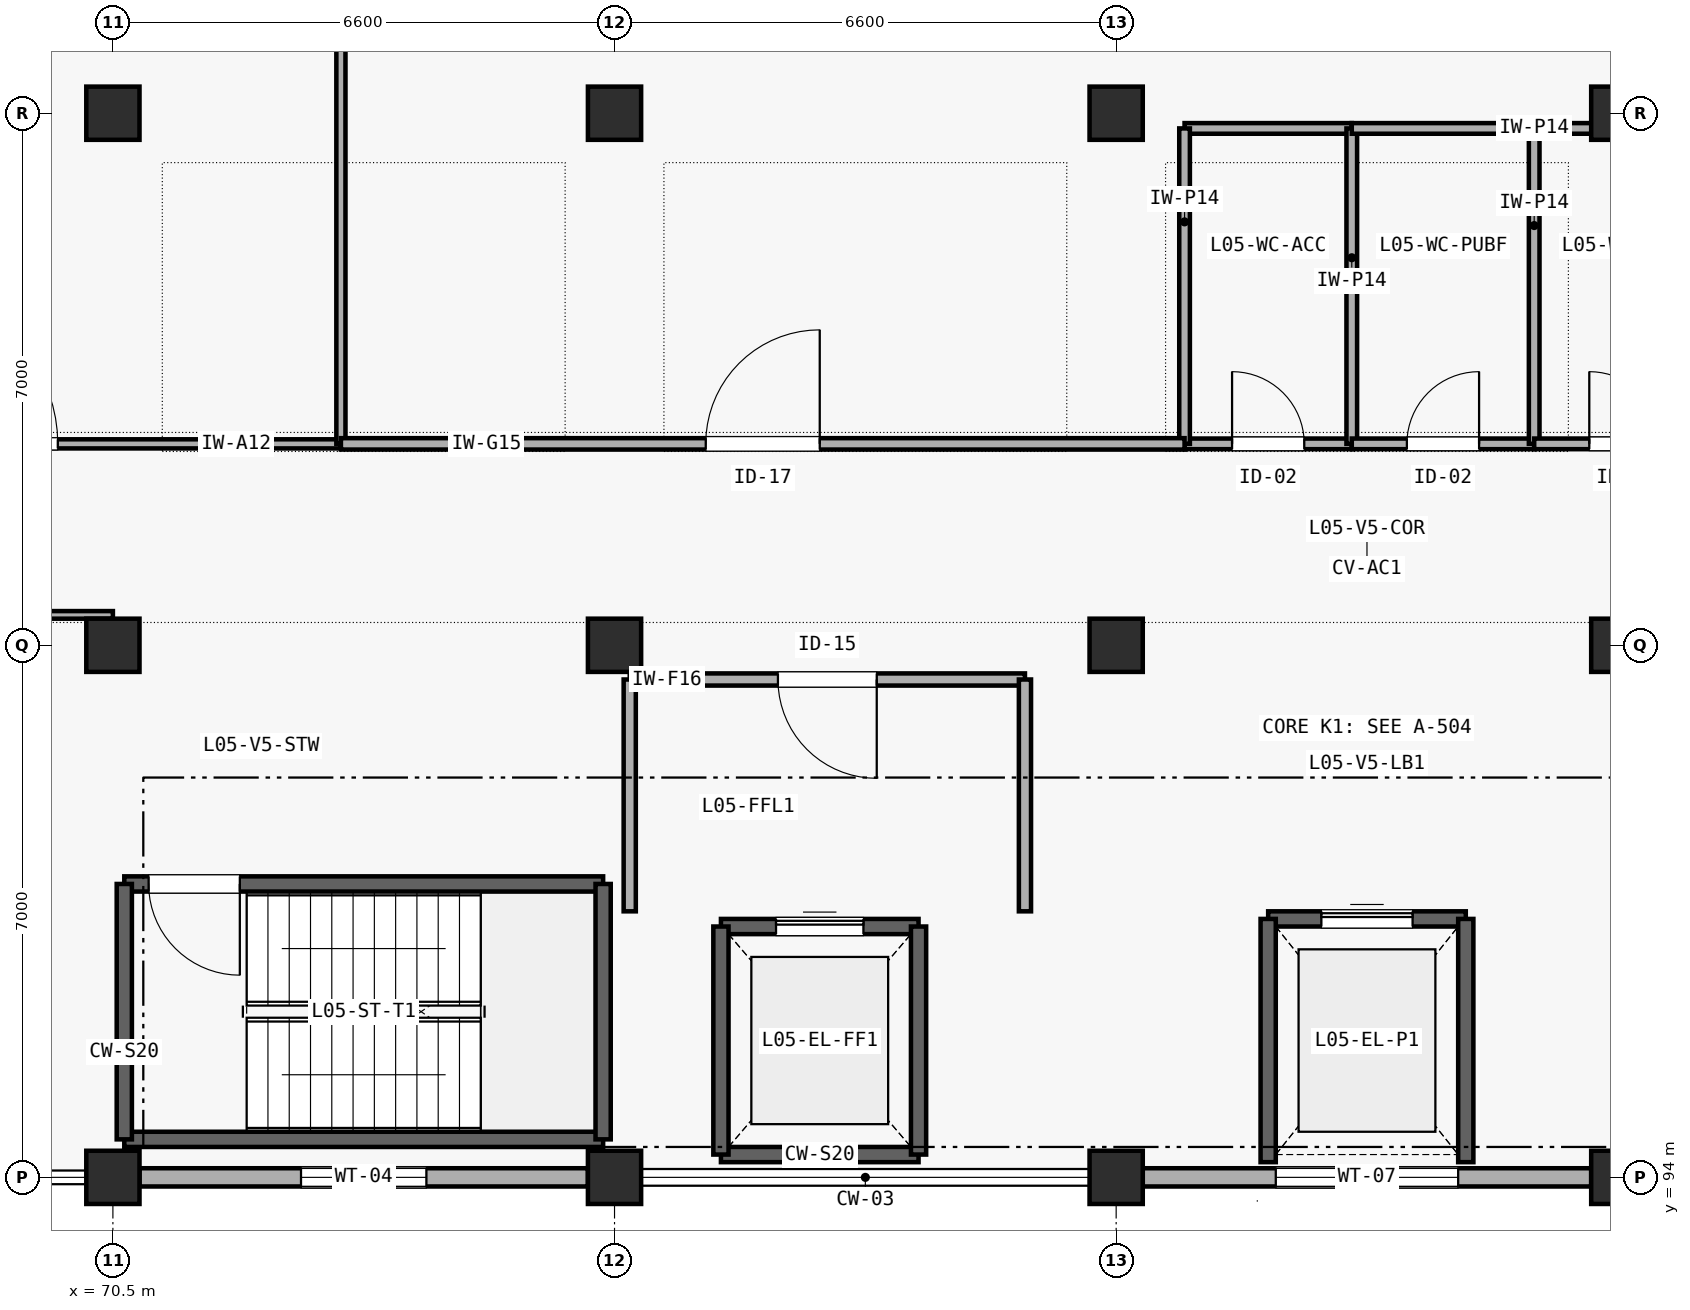
"""IFC4 building model, lengths in metres.
Left out: names, types, materials, properties, quantities, classifications, styles, units other than length and angle.
Written with IfcOpenShell. Run it as: python <this file> out.ifc"""

import sys

from ifc_helpers import new_model, si_unit, direction, frame, frame_2d, origin, origin_2d, place, context, subcontext, project, spatial, rectangle, extrude, element, fill, save


model = new_model("IFC4")
c1 = context("Model", 3, precision=1e-05, world=origin(), true_north=direction((0.0, 1.0)))
c2 = subcontext(c1, "Body", "Model", "MODEL_VIEW")
j1 = project(units=[si_unit("LENGTHUNIT", "METRE"), si_unit("PLANEANGLEUNIT", "RADIAN")], contexts=[c1])
p1 = place(None, origin())
s1 = spatial("IfcSite", under=j1, at=p1, CompositionType="ELEMENT")
p2 = place(p1, origin())
s2 = spatial("IfcBuilding", under=s1, at=p2, CompositionType="ELEMENT")
p3 = place(p2, frame((0.0, 0.0, 21.0)))
s3 = spatial("IfcBuildingStorey", under=s2, at=p3, CompositionType="ELEMENT", Elevation=21.0)
for number, where, z_axis, x_axis in (
    (1, (70.5, 94.0, 0.0), (0.0, 0.0, 1.0), (1.0, 0.0, 0.0)),
    (2, (70.5, 101.0, 0.0), (0.0, 0.0, 1.0), (1.0, 0.0, 0.0)),
    (3, (70.5, 108.0, 0.0), (0.0, 0.0, 1.0), (1.0, 0.0, 0.0)),
    (4, (77.1, 94.0, 0.0), (0.0, 0.0, 1.0), (1.0, 0.0, 0.0)),
    (5, (77.1, 101.0, 0.0), (0.0, 0.0, 1.0), (1.0, 0.0, 0.0)),
    (6, (77.1, 108.0, 0.0), (0.0, 0.0, 1.0), (1.0, 0.0, 0.0)),
    (7, (83.7, 94.0, 0.0), (0.0, 0.0, 1.0), (1.0, 0.0, 0.0)),
    (8, (83.7, 101.0, 0.0), (0.0, 0.0, 1.0), (1.0, 0.0, 0.0)),
    (9, (83.7, 108.0, 0.0), (0.0, 0.0, 1.0), (1.0, 0.0, 0.0)),
    (10, (90.3, 94.0, 0.0), (0.0, 0.0, 1.0), (1.0, 0.0, 0.0)),
    (11, (90.3, 101.0, 0.0), (0.0, 0.0, 1.0), (1.0, 0.0, 0.0)),
    (12, (90.3, 108.0, 0.0), (0.0, 0.0, 1.0), (1.0, 0.0, 0.0)),
):
    element("IfcColumn", number, at=place(p3, frame(where, z_axis=z_axis, x_axis=x_axis)), inside=s3, PredefinedType="COLUMN", context=c2, shape_type="SweptSolid", body=[
        extrude(rectangle(XDim=0.7, YDim=0.7, at=origin_2d()), origin(), (0.0, 0.0, 1.0), 4.2),
    ])
p4 = place(p3, frame((70.85, 94.0, 0.0), z_axis=(0.0, 0.0, 1.0), x_axis=(1.0, 0.0, 0.0)))
e13 = element("IfcWall", 13, at=p4, inside=s3, PredefinedType="SOLIDWALL", context=c2, shape_type="SweptSolid", body=[
    extrude(rectangle(XDim=5.9, YDim=0.24, at=frame_2d((2.95, 0.0))), origin(), (0.0, 0.0, 1.0), 3.385),
])
p5 = place(p4, frame((2.125, 0.0, 0.85)))
e14 = element("IfcOpeningElement", 14, at=p5, cuts=e13, PredefinedType="OPENING", context=c2, shape_type="SweptSolid", body=[
    extrude(rectangle(XDim=1.65, YDim=1.35, at=frame_2d((0.825, 0.675))), frame((0.0, 0.13, 0.0), z_axis=(0.0, -1.0, 0.0), x_axis=(1.0, 0.0, 0.0)), (0.0, 0.0, 1.0), 0.26),
])
p6 = place(p3, frame((84.05, 94.0, 0.0), z_axis=(0.0, 0.0, 1.0), x_axis=(1.0, 0.0, 0.0)))
e15 = element("IfcWall", 15, at=p6, inside=s3, PredefinedType="SOLIDWALL", context=c2, shape_type="SweptSolid", body=[
    extrude(rectangle(XDim=5.9, YDim=0.24, at=frame_2d((2.95, 0.0))), origin(), (0.0, 0.0, 1.0), 3.135),
])
p7 = place(p6, frame((1.75, 0.0, 0.85)))
e16 = element("IfcOpeningElement", 16, at=p7, cuts=e15, PredefinedType="OPENING", context=c2, shape_type="SweptSolid", body=[
    extrude(rectangle(XDim=2.4, YDim=1.35, at=frame_2d((1.2, 0.675))), frame((0.0, 0.13, 0.0), z_axis=(0.0, -1.0, 0.0), x_axis=(1.0, 0.0, 0.0)), (0.0, 0.0, 1.0), 0.26),
])
p8 = place(p3, frame((70.65, 94.5, 0.0), z_axis=(0.0, 0.0, 1.0), x_axis=(1.0, 0.0, 0.0)))
e17 = element("IfcWall", 17, at=p8, inside=s3, PredefinedType="SHEAR", context=c2, shape_type="SweptSolid", body=[
    extrude(rectangle(XDim=6.3, YDim=0.2, at=frame_2d((3.15, 0.0))), origin(), (0.0, 0.0, 1.0), 4.2),
])
p9 = place(p3, frame((70.65, 97.86, 0.0), z_axis=(0.0, 0.0, 1.0), x_axis=(1.0, 0.0, 0.0)))
e18 = element("IfcWall", 18, at=p9, inside=s3, PredefinedType="SHEAR", context=c2, shape_type="SweptSolid", body=[
    extrude(rectangle(XDim=6.3, YDim=0.2, at=frame_2d((3.15, 0.0))), origin(), (0.0, 0.0, 1.0), 4.2),
])
p10 = place(p9, frame((0.32, 0.0, 0.0)))
e19 = element("IfcOpeningElement", 19, at=p10, cuts=e18, PredefinedType="OPENING", context=c2, shape_type="SweptSolid", body=[
    extrude(rectangle(XDim=1.2, YDim=2.15, at=frame_2d((0.6, 1.075))), frame((0.0, 0.11, 0.0), z_axis=(0.0, -1.0, 0.0), x_axis=(1.0, 0.0, 0.0)), (0.0, 0.0, 1.0), 0.22),
])
for number, where, z_axis, x_axis in (
    (20, (70.65, 94.5, 0.0), (0.0, 0.0, 1.0), (0.0, 1.0, 0.0)),
    (21, (76.95, 94.5, 0.0), (0.0, 0.0, 1.0), (0.0, 1.0, 0.0)),
):
    element("IfcWall", number, at=place(p3, frame(where, z_axis=z_axis, x_axis=x_axis)), inside=s3, PredefinedType="SHEAR", context=c2, shape_type="SweptSolid", body=[
        extrude(rectangle(XDim=3.36, YDim=0.2, at=frame_2d((1.68, 0.0))), origin(), (0.0, 0.0, 1.0), 4.2),
    ])
p11 = place(p3, frame((78.5, 94.3, 0.0), z_axis=(0.0, 0.0, 1.0), x_axis=(1.0, 0.0, 0.0)))
e22 = element("IfcWall", 22, at=p11, inside=s3, PredefinedType="SHEAR", context=c2, shape_type="SweptSolid", body=[
    extrude(rectangle(XDim=2.6, YDim=0.2, at=frame_2d((1.3, 0.0))), origin(), (0.0, 0.0, 1.0), 4.2),
])
p12 = place(p3, frame((78.5, 97.3, 0.0), z_axis=(0.0, 0.0, 1.0), x_axis=(1.0, 0.0, 0.0)))
e23 = element("IfcWall", 23, at=p12, inside=s3, PredefinedType="SHEAR", context=c2, shape_type="SweptSolid", body=[
    extrude(rectangle(XDim=2.6, YDim=0.2, at=frame_2d((1.3, 0.0))), origin(), (0.0, 0.0, 1.0), 4.2),
])
p13 = place(p12, frame((0.725, 0.0, 0.0)))
e24 = element("IfcOpeningElement", 24, at=p13, cuts=e23, PredefinedType="OPENING", context=c2, shape_type="SweptSolid", body=[
    extrude(rectangle(XDim=1.15, YDim=2.2, at=frame_2d((0.575, 1.1))), frame((0.0, 0.11, 0.0), z_axis=(0.0, -1.0, 0.0), x_axis=(1.0, 0.0, 0.0)), (0.0, 0.0, 1.0), 0.22),
])
for number, where, z_axis, x_axis in (
    (25, (78.5, 94.3, 0.0), (0.0, 0.0, 1.0), (0.0, 1.0, 0.0)),
    (26, (81.1, 94.3, 0.0), (0.0, 0.0, 1.0), (0.0, 1.0, 0.0)),
):
    element("IfcWall", number, at=place(p3, frame(where, z_axis=z_axis, x_axis=x_axis)), inside=s3, PredefinedType="SHEAR", context=c2, shape_type="SweptSolid", body=[
        extrude(rectangle(XDim=3.0, YDim=0.2, at=frame_2d((1.5, 0.0))), origin(), (0.0, 0.0, 1.0), 4.2),
    ])
p14 = place(p3, frame((85.7, 97.4, 0.0), z_axis=(0.0, 0.0, 1.0), x_axis=(1.0, 0.0, 0.0)))
e27 = element("IfcWall", 27, at=p14, inside=s3, PredefinedType="SHEAR", context=c2, shape_type="SweptSolid", body=[
    extrude(rectangle(XDim=2.6, YDim=0.2, at=frame_2d((1.3, 0.0))), origin(), (0.0, 0.0, 1.0), 4.2),
])
p15 = place(p14, frame((0.7, 0.0, 0.0)))
e28 = element("IfcOpeningElement", 28, at=p15, cuts=e27, PredefinedType="OPENING", context=c2, shape_type="SweptSolid", body=[
    extrude(rectangle(XDim=1.2, YDim=2.2, at=frame_2d((0.6, 1.1))), frame((0.0, 0.11, 0.0), z_axis=(0.0, -1.0, 0.0), x_axis=(1.0, 0.0, 0.0)), (0.0, 0.0, 1.0), 0.22),
])
for number, where, z_axis, x_axis in (
    (29, (85.7, 94.2, 0.0), (0.0, 0.0, 1.0), (0.0, 1.0, 0.0)),
    (30, (88.3, 94.2, 0.0), (0.0, 0.0, 1.0), (0.0, 1.0, 0.0)),
):
    element("IfcWall", number, at=place(p3, frame(where, z_axis=z_axis, x_axis=x_axis)), inside=s3, PredefinedType="SHEAR", context=c2, shape_type="SweptSolid", body=[
        extrude(rectangle(XDim=3.2, YDim=0.2, at=frame_2d((1.6, 0.0))), origin(), (0.0, 0.0, 1.0), 4.2),
    ])
p16 = place(p3, frame((77.3, 100.55, 0.0), z_axis=(0.0, 0.0, 1.0), x_axis=(1.0, 0.0, 0.0)))
e31 = element("IfcWall", 31, at=p16, inside=s3, PredefinedType="SOLIDWALL", context=c2, shape_type="SweptSolid", body=[
    extrude(rectangle(XDim=5.2, YDim=0.16, at=frame_2d((2.6, 0.0))), origin(), (0.0, 0.0, 1.0), 3.9),
])
p17 = place(p16, frame((1.95, 0.0, 0.0)))
e32 = element("IfcOpeningElement", 32, at=p17, cuts=e31, PredefinedType="OPENING", context=c2, shape_type="SweptSolid", body=[
    extrude(rectangle(XDim=1.3, YDim=2.15, at=frame_2d((0.65, 1.075))), frame((0.0, 0.09, 0.0), z_axis=(0.0, -1.0, 0.0), x_axis=(1.0, 0.0, 0.0)), (0.0, 0.0, 1.0), 0.18),
])
p18 = place(p3, frame((77.3, 97.5, 0.0), z_axis=(0.0, 0.0, 1.0), x_axis=(0.0, 1.0, 0.0)))
e33 = element("IfcWall", 33, at=p18, inside=s3, PredefinedType="SOLIDWALL", context=c2, shape_type="SweptSolid", body=[
    extrude(rectangle(XDim=3.05, YDim=0.16, at=frame_2d((1.525, 0.0))), origin(), (0.0, 0.0, 1.0), 3.405),
])
p19 = place(p3, frame((82.5, 97.5, 0.0), z_axis=(0.0, 0.0, 1.0), x_axis=(0.0, 1.0, 0.0)))
e34 = element("IfcWall", 34, at=p19, inside=s3, PredefinedType="SOLIDWALL", context=c2, shape_type="SweptSolid", body=[
    extrude(rectangle(XDim=3.05, YDim=0.16, at=frame_2d((1.525, 0.0))), origin(), (0.0, 0.0, 1.0), 3.9),
])
p20 = place(p3, frame((84.6, 103.65, 0.0), z_axis=(0.0, 0.0, 1.0), x_axis=(1.0, 0.0, 0.0)))
e35 = element("IfcWall", 35, at=p20, inside=s3, PredefinedType="PLUMBINGWALL", context=c2, shape_type="SweptSolid", body=[
    extrude(rectangle(XDim=2.2, YDim=0.14, at=frame_2d((1.1, 0.0))), origin(), (0.0, 0.0, 1.0), 3.9),
])
p21 = place(p20, frame((0.625, 0.0, 0.0)))
e36 = element("IfcOpeningElement", 36, at=p21, cuts=e35, PredefinedType="OPENING", context=c2, shape_type="SweptSolid", body=[
    extrude(rectangle(XDim=0.95, YDim=2.1, at=frame_2d((0.475, 1.05))), frame((0.0, 0.08, 0.0), z_axis=(0.0, -1.0, 0.0), x_axis=(1.0, 0.0, 0.0)), (0.0, 0.0, 1.0), 0.16),
])
p22 = place(p3, frame((84.6, 107.8, 0.0), z_axis=(0.0, 0.0, 1.0), x_axis=(1.0, 0.0, 0.0)))
e37 = element("IfcWall", 37, at=p22, inside=s3, PredefinedType="PLUMBINGWALL", context=c2, shape_type="SweptSolid", body=[
    extrude(rectangle(XDim=2.2, YDim=0.14, at=frame_2d((1.1, 0.0))), origin(), (0.0, 0.0, 1.0), 3.135),
])
for number, where, z_axis, x_axis in (
    (38, (84.6, 103.65, 0.0), (0.0, 0.0, 1.0), (0.0, 1.0, 0.0)),
    (39, (86.8, 103.65, 0.0), (0.0, 0.0, 1.0), (0.0, 1.0, 0.0)),
):
    element("IfcWall", number, at=place(p3, frame(where, z_axis=z_axis, x_axis=x_axis)), inside=s3, PredefinedType="PLUMBINGWALL", context=c2, shape_type="SweptSolid", body=[
        extrude(rectangle(XDim=4.15, YDim=0.14, at=frame_2d((2.075, 0.0))), origin(), (0.0, 0.0, 1.0), 3.9),
    ])
p23 = place(p3, frame((86.8, 103.65, 0.0), z_axis=(0.0, 0.0, 1.0), x_axis=(1.0, 0.0, 0.0)))
e40 = element("IfcWall", 40, at=p23, inside=s3, PredefinedType="PLUMBINGWALL", context=c2, shape_type="SweptSolid", body=[
    extrude(rectangle(XDim=2.4, YDim=0.14, at=frame_2d((1.2, 0.0))), origin(), (0.0, 0.0, 1.0), 3.9),
])
p24 = place(p23, frame((0.725, 0.0, 0.0)))
e41 = element("IfcOpeningElement", 41, at=p24, cuts=e40, PredefinedType="OPENING", context=c2, shape_type="SweptSolid", body=[
    extrude(rectangle(XDim=0.95, YDim=2.1, at=frame_2d((0.475, 1.05))), frame((0.0, 0.08, 0.0), z_axis=(0.0, -1.0, 0.0), x_axis=(1.0, 0.0, 0.0)), (0.0, 0.0, 1.0), 0.16),
])
p25 = place(p3, frame((86.8, 107.8, 0.0), z_axis=(0.0, 0.0, 1.0), x_axis=(1.0, 0.0, 0.0)))
e42 = element("IfcWall", 42, at=p25, inside=s3, PredefinedType="PLUMBINGWALL", context=c2, shape_type="SweptSolid", body=[
    extrude(rectangle(XDim=2.4, YDim=0.14, at=frame_2d((1.2, 0.0))), origin(), (0.0, 0.0, 1.0), 3.135),
])
p26 = place(p3, frame((89.2, 103.65, 0.0), z_axis=(0.0, 0.0, 1.0), x_axis=(0.0, 1.0, 0.0)))
e43 = element("IfcWall", 43, at=p26, inside=s3, PredefinedType="PLUMBINGWALL", context=c2, shape_type="SweptSolid", body=[
    extrude(rectangle(XDim=4.15, YDim=0.14, at=frame_2d((2.075, 0.0))), origin(), (0.0, 0.0, 1.0), 3.9),
])
p27 = place(p3, frame((89.2, 103.65, 0.0), z_axis=(0.0, 0.0, 1.0), x_axis=(1.0, 0.0, 0.0)))
e44 = element("IfcWall", 44, at=p27, inside=s3, PredefinedType="PLUMBINGWALL", context=c2, shape_type="SweptSolid", body=[
    extrude(rectangle(XDim=2.4, YDim=0.14, at=frame_2d((1.2, 0.0))), origin(), (0.0, 0.0, 1.0), 3.9),
])
p28 = place(p27, frame((0.725, 0.0, 0.0)))
e45 = element("IfcOpeningElement", 45, at=p28, cuts=e44, PredefinedType="OPENING", context=c2, shape_type="SweptSolid", body=[
    extrude(rectangle(XDim=0.95, YDim=2.1, at=frame_2d((0.475, 1.05))), frame((0.0, 0.08, 0.0), z_axis=(0.0, -1.0, 0.0), x_axis=(1.0, 0.0, 0.0)), (0.0, 0.0, 1.0), 0.16),
])
p29 = place(p3, frame((89.2, 107.8, 0.0), z_axis=(0.0, 0.0, 1.0), x_axis=(1.0, 0.0, 0.0)))
e46 = element("IfcWall", 46, at=p29, inside=s3, PredefinedType="PLUMBINGWALL", context=c2, shape_type="SweptSolid", body=[
    extrude(rectangle(XDim=2.4, YDim=0.14, at=frame_2d((1.2, 0.0))), origin(), (0.0, 0.0, 1.0), 3.135),
])
p30 = place(p3, frame((64.1, 103.65, 0.0), z_axis=(0.0, 0.0, 1.0), x_axis=(1.0, 0.0, 0.0)))
e47 = element("IfcWall", 47, at=p30, inside=s3, PredefinedType="PARTITIONING", context=c2, shape_type="SweptSolid", body=[
    extrude(rectangle(XDim=9.4, YDim=0.12, at=frame_2d((4.7, 0.0))), origin(), (0.0, 0.0, 1.0), 3.9),
])
p31 = place(p30, frame((3.725, 0.0, 0.0)))
e48 = element("IfcOpeningElement", 48, at=p31, cuts=e47, PredefinedType="OPENING", context=c2, shape_type="SweptSolid", body=[
    extrude(rectangle(XDim=1.95, YDim=2.3, at=frame_2d((0.975, 1.15))), frame((0.0, 0.07, 0.0), z_axis=(0.0, -1.0, 0.0), x_axis=(1.0, 0.0, 0.0)), (0.0, 0.0, 1.0), 0.14),
])
p32 = place(p3, frame((73.5, 103.65, 0.0), z_axis=(0.0, 0.0, 1.0), x_axis=(0.0, 1.0, 0.0)))
e49 = element("IfcWall", 49, at=p32, inside=s3, PredefinedType="PARTITIONING", context=c2, shape_type="SweptSolid", body=[
    extrude(rectangle(XDim=11.15, YDim=0.12, at=frame_2d((5.575, 0.0))), origin(), (0.0, 0.0, 1.0), 3.9),
])
p33 = place(p3, frame((73.5, 103.65, 0.0), z_axis=(0.0, 0.0, 1.0), x_axis=(1.0, 0.0, 0.0)))
e50 = element("IfcWall", 50, at=p33, inside=s3, PredefinedType="PARTITIONING", context=c2, shape_type="SweptSolid", body=[
    extrude(rectangle(XDim=11.1, YDim=0.15, at=frame_2d((5.55, 0.0))), origin(), (0.0, 0.0, 1.0), 3.9),
])
p34 = place(p33, frame((4.8, 0.0, 0.0)))
e51 = element("IfcOpeningElement", 51, at=p34, cuts=e50, PredefinedType="OPENING", context=c2, shape_type="SweptSolid", body=[
    extrude(rectangle(XDim=1.5, YDim=2.15, at=frame_2d((0.75, 1.075))), frame((0.0, 0.085, 0.0), z_axis=(0.0, -1.0, 0.0), x_axis=(1.0, 0.0, 0.0)), (0.0, 0.0, 1.0), 0.17),
])
p35 = place(p3, frame((64.1, 101.4, 0.0), z_axis=(0.0, 0.0, 1.0), x_axis=(1.0, 0.0, 0.0)))
e52 = element("IfcWall", 52, at=p35, inside=s3, PredefinedType="PARTITIONING", context=c2, shape_type="SweptSolid", body=[
    extrude(rectangle(XDim=6.4, YDim=0.1, at=frame_2d((3.2, 0.0))), origin(), (0.0, 0.0, 1.0), 3.9),
])
p36 = place(p35, frame((2.725, 0.0, 0.0)))
e53 = element("IfcOpeningElement", 53, at=p36, cuts=e52, PredefinedType="OPENING", context=c2, shape_type="SweptSolid", body=[
    extrude(rectangle(XDim=0.95, YDim=2.1, at=frame_2d((0.475, 1.05))), frame((0.0, 0.06, 0.0), z_axis=(0.0, -1.0, 0.0), x_axis=(1.0, 0.0, 0.0)), (0.0, 0.0, 1.0), 0.12),
])
p37 = place(p5, origin())
e54 = element("IfcWindow", 54, at=p37, inside=s3, PartitioningType="SINGLE_PANEL", PredefinedType="WINDOW", context=c2, shape_type="SweptSolid", body=[
    extrude(rectangle(XDim=1.65, YDim=1.35, at=frame_2d((0.825, 0.675))), frame((0.0, 0.03, 0.0), z_axis=(0.0, -1.0, 0.0), x_axis=(1.0, 0.0, 0.0)), (0.0, 0.0, 1.0), 0.06),
])
fill(e14, e54)
p38 = place(p7, origin())
e55 = element("IfcWindow", 55, at=p38, inside=s3, PartitioningType="SINGLE_PANEL", PredefinedType="WINDOW", context=c2, shape_type="SweptSolid", body=[
    extrude(rectangle(XDim=2.4, YDim=1.35, at=frame_2d((1.2, 0.675))), frame((0.0, 0.03, 0.0), z_axis=(0.0, -1.0, 0.0), x_axis=(1.0, 0.0, 0.0)), (0.0, 0.0, 1.0), 0.06),
])
fill(e16, e55)
p39 = place(p10, frame((1.2, 0.0, 0.0), z_axis=(0.0, 0.0, 1.0), x_axis=(-1.0, 0.0, 0.0)))
e56 = element("IfcDoor", 56, at=p39, inside=s3, OperationType="SINGLE_SWING_LEFT", PredefinedType="DOOR", context=c2, shape_type="SweptSolid", body=[
    extrude(rectangle(XDim=1.2, YDim=2.15, at=frame_2d((0.6, 1.075))), frame((0.0, 0.025, 0.0), z_axis=(0.0, -1.0, 0.0), x_axis=(1.0, 0.0, 0.0)), (0.0, 0.0, 1.0), 0.05),
])
fill(e19, e56)
p40 = place(p13, origin())
e57 = element("IfcDoor", 57, at=p40, inside=s3, OperationType="SLIDING_TO_LEFT", PredefinedType="DOOR", context=c2, shape_type="SweptSolid", body=[
    extrude(rectangle(XDim=1.15, YDim=2.2, at=frame_2d((0.575, 1.1))), frame((0.0, 0.025, 0.0), z_axis=(0.0, -1.0, 0.0), x_axis=(1.0, 0.0, 0.0)), (0.0, 0.0, 1.0), 0.05),
])
fill(e24, e57)
p41 = place(p15, origin())
e58 = element("IfcDoor", 58, at=p41, inside=s3, OperationType="SLIDING_TO_LEFT", PredefinedType="DOOR", context=c2, shape_type="SweptSolid", body=[
    extrude(rectangle(XDim=1.2, YDim=2.2, at=frame_2d((0.6, 1.1))), frame((0.0, 0.025, 0.0), z_axis=(0.0, -1.0, 0.0), x_axis=(1.0, 0.0, 0.0)), (0.0, 0.0, 1.0), 0.05),
])
fill(e28, e58)
p42 = place(p17, frame((1.3, 0.0, 0.0), z_axis=(0.0, 0.0, 1.0), x_axis=(-1.0, 0.0, 0.0)))
e59 = element("IfcDoor", 59, at=p42, inside=s3, OperationType="SINGLE_SWING_LEFT", PredefinedType="DOOR", context=c2, shape_type="SweptSolid", body=[
    extrude(rectangle(XDim=1.3, YDim=2.15, at=frame_2d((0.65, 1.075))), frame((0.0, 0.025, 0.0), z_axis=(0.0, -1.0, 0.0), x_axis=(1.0, 0.0, 0.0)), (0.0, 0.0, 1.0), 0.05),
])
fill(e32, e59)
p43 = place(p21, origin())
e60 = element("IfcDoor", 60, at=p43, inside=s3, OperationType="SINGLE_SWING_LEFT", PredefinedType="DOOR", context=c2, shape_type="SweptSolid", body=[
    extrude(rectangle(XDim=0.95, YDim=2.1, at=frame_2d((0.475, 1.05))), frame((0.0, 0.025, 0.0), z_axis=(0.0, -1.0, 0.0), x_axis=(1.0, 0.0, 0.0)), (0.0, 0.0, 1.0), 0.05),
])
fill(e36, e60)
p44 = place(p24, origin())
e61 = element("IfcDoor", 61, at=p44, inside=s3, OperationType="SINGLE_SWING_RIGHT", PredefinedType="DOOR", context=c2, shape_type="SweptSolid", body=[
    extrude(rectangle(XDim=0.95, YDim=2.1, at=frame_2d((0.475, 1.05))), frame((0.0, 0.025, 0.0), z_axis=(0.0, -1.0, 0.0), x_axis=(1.0, 0.0, 0.0)), (0.0, 0.0, 1.0), 0.05),
])
fill(e41, e61)
p45 = place(p28, origin())
e62 = element("IfcDoor", 62, at=p45, inside=s3, OperationType="SINGLE_SWING_LEFT", PredefinedType="DOOR", context=c2, shape_type="SweptSolid", body=[
    extrude(rectangle(XDim=0.95, YDim=2.1, at=frame_2d((0.475, 1.05))), frame((0.0, 0.025, 0.0), z_axis=(0.0, -1.0, 0.0), x_axis=(1.0, 0.0, 0.0)), (0.0, 0.0, 1.0), 0.05),
])
fill(e45, e62)
p46 = place(p31, origin())
e63 = element("IfcDoor", 63, at=p46, inside=s3, OperationType="SINGLE_SWING_LEFT", PredefinedType="DOOR", context=c2, shape_type="SweptSolid", body=[
    extrude(rectangle(XDim=1.95, YDim=2.3, at=frame_2d((0.975, 1.15))), frame((0.0, 0.025, 0.0), z_axis=(0.0, -1.0, 0.0), x_axis=(1.0, 0.0, 0.0)), (0.0, 0.0, 1.0), 0.05),
])
fill(e48, e63)
p47 = place(p34, origin())
e64 = element("IfcDoor", 64, at=p47, inside=s3, OperationType="SINGLE_SWING_RIGHT", PredefinedType="DOOR", context=c2, shape_type="SweptSolid", body=[
    extrude(rectangle(XDim=1.5, YDim=2.15, at=frame_2d((0.75, 1.075))), frame((0.0, 0.025, 0.0), z_axis=(0.0, -1.0, 0.0), x_axis=(1.0, 0.0, 0.0)), (0.0, 0.0, 1.0), 0.05),
])
fill(e51, e64)
save(model, sys.argv[1])
